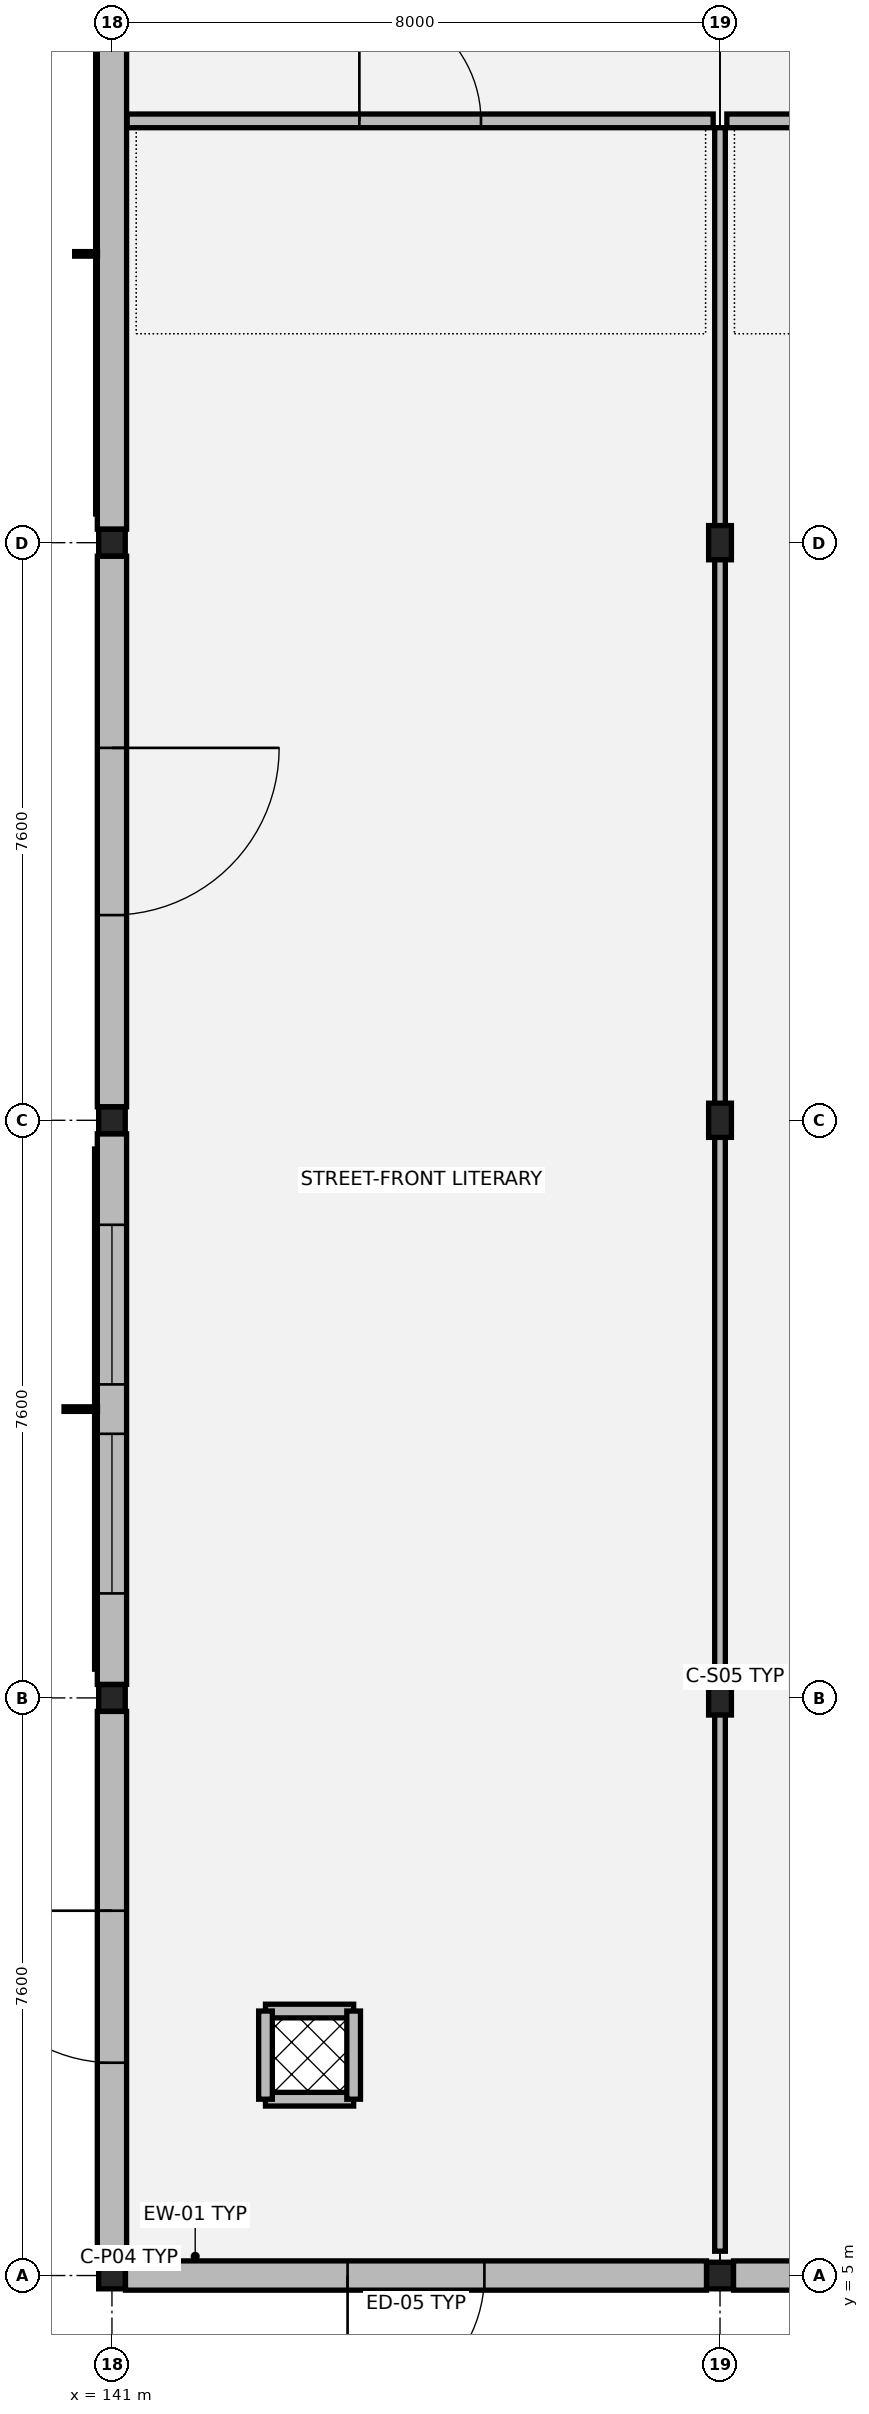
"""IFC4 building model, lengths in metres.
Left out: names, types, materials, properties, quantities, classifications, styles, units other than length and angle.
Written with IfcOpenShell. Run it as: python <this file> out.ifc"""

import sys

from ifc_helpers import new_model, si_unit, direction, frame, frame_2d, origin, origin_2d, place, context, subcontext, project, spatial, rectangle, hollow_rectangle, i_section, extrude, element, fill, save


model = new_model("IFC4")
c1 = context("Model", 3, precision=1e-05, world=origin(), true_north=direction((0.0, 1.0)))
c2 = subcontext(c1, "Body", "Model", "MODEL_VIEW")
j1 = project(units=[si_unit("LENGTHUNIT", "METRE"), si_unit("PLANEANGLEUNIT", "RADIAN")], contexts=[c1])
p1 = place(None, origin())
s1 = spatial("IfcSite", under=j1, at=p1, CompositionType="ELEMENT")
p2 = place(p1, origin())
s2 = spatial("IfcBuilding", under=s1, at=p2, CompositionType="ELEMENT")
p3 = place(p2, origin())
s3 = spatial("IfcBuildingStorey", under=s2, at=p3, CompositionType="ELEMENT", Elevation=0.0)
for number, where, z_axis, x_axis in (
    (1, (141.0, 5.0, 0.0), (0.0, 0.0, 1.0), (1.0, 0.0, 0.0)),
    (2, (141.0, 12.6, 0.0), (0.0, 0.0, 1.0), (1.0, 0.0, 0.0)),
    (3, (141.0, 20.2, 0.0), (0.0, 0.0, 1.0), (1.0, 0.0, 0.0)),
    (4, (141.0, 27.8, 0.0), (0.0, 0.0, 1.0), (1.0, 0.0, 0.0)),
    (5, (149.0, 5.0, 0.0), (0.0, 0.0, 1.0), (1.0, 0.0, 0.0)),
):
    element("IfcColumn", number, at=place(p3, frame(where, z_axis=z_axis, x_axis=x_axis)), inside=s3, PredefinedType="COLUMN", context=c2, shape_type="SweptSolid", body=[
        extrude(hollow_rectangle(XDim=0.35, YDim=0.35, WallThickness=0.014, at=origin_2d()), origin(), (0.0, 0.0, 1.0), 5.075),
    ])
for number, where, z_axis, x_axis in (
    (6, (149.0, 12.6, 0.0), (0.0, 0.0, 1.0), (1.0, 0.0, 0.0)),
    (7, (149.0, 20.2, 0.0), (0.0, 0.0, 1.0), (1.0, 0.0, 0.0)),
    (8, (149.0, 27.8, 0.0), (0.0, 0.0, 1.0), (1.0, 0.0, 0.0)),
):
    element("IfcColumn", number, at=place(p3, frame(where, z_axis=z_axis, x_axis=x_axis)), inside=s3, PredefinedType="COLUMN", context=c2, shape_type="SweptSolid", body=[
        extrude(i_section(OverallWidth=0.3, OverallDepth=0.45, WebThickness=0.014, FlangeThickness=0.026, at=origin_2d()), origin(), (0.0, 0.0, 1.0), 5.075),
    ])
p4 = place(p3, frame((141.178, 5.0, 0.0), z_axis=(0.0, 0.0, 1.0), x_axis=(1.0, 0.0, 0.0)))
e9 = element("IfcWall", 9, at=p4, inside=s3, PredefinedType="SOLIDWALL", context=c2, shape_type="SweptSolid", body=[
    extrude(rectangle(XDim=7.644, YDim=0.385, at=frame_2d((3.822, 0.0))), origin(), (0.0, 0.0, 1.0), 4.5),
])
p5 = place(p4, frame((2.922, 0.0, 0.0)))
e10 = element("IfcOpeningElement", 10, at=p5, cuts=e9, PredefinedType="OPENING", context=c2, shape_type="SweptSolid", body=[
    extrude(rectangle(XDim=1.8, YDim=2.4, at=frame_2d((0.9, 1.2))), frame((0.0, 0.202, 0.0), z_axis=(0.0, -1.0, 0.0), x_axis=(1.0, 0.0, 0.0)), (0.0, 0.0, 1.0), 0.405),
])
p6 = place(p3, frame((149.178, 5.0, 0.0), z_axis=(0.0, 0.0, 1.0), x_axis=(1.0, 0.0, 0.0)))
e11 = element("IfcWall", 11, at=p6, inside=s3, PredefinedType="SOLIDWALL", context=c2, shape_type="SweptSolid", body=[
    extrude(rectangle(XDim=7.644, YDim=0.385, at=frame_2d((3.822, 0.0))), origin(), (0.0, 0.0, 1.0), 4.5),
])
p7 = place(p6, frame((2.872, 0.0, 0.0)))
e12 = element("IfcOpeningElement", 12, at=p7, cuts=e11, PredefinedType="OPENING", context=c2, shape_type="SweptSolid", body=[
    extrude(rectangle(XDim=1.9, YDim=2.42, at=frame_2d((0.95, 1.21))), frame((0.0, 0.202, 0.0), z_axis=(0.0, -1.0, 0.0), x_axis=(1.0, 0.0, 0.0)), (0.0, 0.0, 1.0), 0.405),
])
p8 = place(p3, frame((141.0, 35.222, 0.0), z_axis=(0.0, 0.0, 1.0), x_axis=(0.0, -1.0, 0.0)))
e13 = element("IfcWall", 13, at=p8, inside=s3, PredefinedType="SOLIDWALL", context=c2, shape_type="SweptSolid", body=[
    extrude(rectangle(XDim=7.244, YDim=0.385, at=frame_2d((3.622, 0.0))), origin(), (0.0, 0.0, 1.0), 4.5),
])
p9 = place(p3, frame((141.0, 27.622, 0.0), z_axis=(0.0, 0.0, 1.0), x_axis=(0.0, -1.0, 0.0)))
e14 = element("IfcWall", 14, at=p9, inside=s3, PredefinedType="SOLIDWALL", context=c2, shape_type="SweptSolid", body=[
    extrude(rectangle(XDim=7.244, YDim=0.385, at=frame_2d((3.622, 0.0))), origin(), (0.0, 0.0, 1.0), 4.5),
])
p10 = place(p9, frame((2.522, 0.0, 0.0)))
e15 = element("IfcOpeningElement", 15, at=p10, cuts=e14, PredefinedType="OPENING", context=c2, shape_type="SweptSolid", body=[
    extrude(rectangle(XDim=2.2, YDim=2.5, at=frame_2d((1.1, 1.25))), frame((0.0, 0.202, 0.0), z_axis=(0.0, -1.0, 0.0), x_axis=(1.0, 0.0, 0.0)), (0.0, 0.0, 1.0), 0.405),
])
p11 = place(p3, frame((141.0, 20.022, 0.0), z_axis=(0.0, 0.0, 1.0), x_axis=(0.0, -1.0, 0.0)))
e16 = element("IfcWall", 16, at=p11, inside=s3, PredefinedType="SOLIDWALL", context=c2, shape_type="SweptSolid", body=[
    extrude(rectangle(XDim=7.244, YDim=0.385, at=frame_2d((3.622, 0.0))), origin(), (0.0, 0.0, 1.0), 4.5),
])
p12 = place(p11, frame((1.197, 0.0, 0.8)))
e17 = element("IfcOpeningElement", 17, at=p12, cuts=e16, PredefinedType="OPENING", context=c2, shape_type="SweptSolid", body=[
    extrude(rectangle(XDim=2.1, YDim=2.25, at=frame_2d((1.05, 1.125))), frame((0.0, 0.202, 0.0), z_axis=(0.0, -1.0, 0.0), x_axis=(1.0, 0.0, 0.0)), (0.0, 0.0, 1.0), 0.405),
])
p13 = place(p11, frame((3.947, 0.0, 0.8)))
e18 = element("IfcOpeningElement", 18, at=p13, cuts=e16, PredefinedType="OPENING", context=c2, shape_type="SweptSolid", body=[
    extrude(rectangle(XDim=2.1, YDim=2.25, at=frame_2d((1.05, 1.125))), frame((0.0, 0.202, 0.0), z_axis=(0.0, -1.0, 0.0), x_axis=(1.0, 0.0, 0.0)), (0.0, 0.0, 1.0), 0.405),
])
p14 = place(p3, frame((141.0, 12.422, 0.0), z_axis=(0.0, 0.0, 1.0), x_axis=(0.0, -1.0, 0.0)))
e19 = element("IfcWall", 19, at=p14, inside=s3, PredefinedType="SOLIDWALL", context=c2, shape_type="SweptSolid", body=[
    extrude(rectangle(XDim=7.244, YDim=0.385, at=frame_2d((3.622, 0.0))), origin(), (0.0, 0.0, 1.0), 4.5),
])
p15 = place(p14, frame((2.622, 0.0, 0.0)))
e20 = element("IfcOpeningElement", 20, at=p15, cuts=e19, PredefinedType="OPENING", context=c2, shape_type="SweptSolid", body=[
    extrude(rectangle(XDim=2.0, YDim=2.45, at=frame_2d((1.0, 1.225))), frame((0.0, 0.202, 0.0), z_axis=(0.0, -1.0, 0.0), x_axis=(1.0, 0.0, 0.0)), (0.0, 0.0, 1.0), 0.405),
])
for number, where, z_axis, x_axis in (
    (21, (143.02, 7.32, 0.0), (0.0, 0.0, 1.0), (1.0, 0.0, 0.0)),
    (22, (144.18, 8.48, 0.0), (0.0, 0.0, 1.0), (-1.0, 0.0, 0.0)),
    (23, (143.02, 8.48, 0.0), (0.0, 0.0, 1.0), (0.0, -1.0, 0.0)),
    (24, (144.18, 7.32, 0.0), (0.0, 0.0, 1.0), (0.0, 1.0, 0.0)),
):
    element("IfcWall", number, at=place(p3, frame(where, z_axis=z_axis, x_axis=x_axis)), inside=s3, PredefinedType="PARTITIONING", context=c2, shape_type="SweptSolid", body=[
        extrude(rectangle(XDim=1.16, YDim=0.18, at=frame_2d((0.58, 0.0))), origin(), (0.0, 0.0, 1.0), 4.2),
    ])
p16 = place(p3, frame((141.2, 33.35, 0.0), z_axis=(0.0, 0.0, 1.0), x_axis=(1.0, 0.0, 0.0)))
e25 = element("IfcWall", 25, at=p16, inside=s3, PredefinedType="PARTITIONING", context=c2, shape_type="SweptSolid", body=[
    extrude(rectangle(XDim=7.71, YDim=0.18, at=frame_2d((3.855, 0.0))), origin(), (0.0, 0.0, 1.0), 4.2),
])
p17 = place(p16, frame((3.055, 0.0, 0.0)))
e26 = element("IfcOpeningElement", 26, at=p17, cuts=e25, PredefinedType="OPENING", context=c2, shape_type="SweptSolid", body=[
    extrude(rectangle(XDim=1.6, YDim=2.25, at=frame_2d((0.8, 1.125))), frame((0.0, 0.1, 0.0), z_axis=(0.0, -1.0, 0.0), x_axis=(1.0, 0.0, 0.0)), (0.0, 0.0, 1.0), 0.2),
])
p18 = place(p3, frame((149.09, 33.35, 0.0), z_axis=(0.0, 0.0, 1.0), x_axis=(1.0, 0.0, 0.0)))
e27 = element("IfcWall", 27, at=p18, inside=s3, PredefinedType="PARTITIONING", context=c2, shape_type="SweptSolid", body=[
    extrude(rectangle(XDim=8.46, YDim=0.18, at=frame_2d((4.23, 0.0))), origin(), (0.0, 0.0, 1.0), 4.2),
])
p19 = place(p18, frame((3.53, 0.0, 0.0)))
e28 = element("IfcOpeningElement", 28, at=p19, cuts=e27, PredefinedType="OPENING", context=c2, shape_type="SweptSolid", body=[
    extrude(rectangle(XDim=1.4, YDim=2.22, at=frame_2d((0.7, 1.11))), frame((0.0, 0.1, 0.0), z_axis=(0.0, -1.0, 0.0), x_axis=(1.0, 0.0, 0.0)), (0.0, 0.0, 1.0), 0.2),
])
p20 = place(p3, frame((149.0, 5.32, 0.0), z_axis=(0.0, 0.0, 1.0), x_axis=(0.0, 1.0, 0.0)))
e29 = element("IfcWall", 29, at=p20, inside=s3, PredefinedType="PARTITIONING", context=c2, shape_type="SweptSolid", body=[
    extrude(rectangle(XDim=27.94, YDim=0.14, at=frame_2d((13.97, 0.0))), origin(), (0.0, 0.0, 1.0), 4.2),
])
p21 = place(p5, origin())
e30 = element("IfcDoor", 30, at=p21, inside=s3, OperationType="SINGLE_SWING_RIGHT", PredefinedType="DOOR", context=c2, shape_type="SweptSolid", body=[
    extrude(rectangle(XDim=1.8, YDim=2.4, at=frame_2d((0.9, 1.2))), frame((0.0, 0.025, 0.0), z_axis=(0.0, -1.0, 0.0), x_axis=(1.0, 0.0, 0.0)), (0.0, 0.0, 1.0), 0.05),
])
fill(e10, e30)
p22 = place(p10, origin())
e31 = element("IfcDoor", 31, at=p22, inside=s3, OperationType="SINGLE_SWING_LEFT", PredefinedType="DOOR", context=c2, shape_type="SweptSolid", body=[
    extrude(rectangle(XDim=2.2, YDim=2.5, at=frame_2d((1.1, 1.25))), frame((0.0, 0.025, 0.0), z_axis=(0.0, -1.0, 0.0), x_axis=(1.0, 0.0, 0.0)), (0.0, 0.0, 1.0), 0.05),
])
fill(e15, e31)
p23 = place(p12, origin())
e32 = element("IfcWindow", 32, at=p23, inside=s3, PartitioningType="SINGLE_PANEL", PredefinedType="WINDOW", context=c2, shape_type="SweptSolid", body=[
    extrude(rectangle(XDim=2.1, YDim=2.25, at=frame_2d((1.05, 1.125))), frame((0.0, 0.03, 0.0), z_axis=(0.0, -1.0, 0.0), x_axis=(1.0, 0.0, 0.0)), (0.0, 0.0, 1.0), 0.06),
])
fill(e17, e32)
p24 = place(p13, origin())
e33 = element("IfcWindow", 33, at=p24, inside=s3, PartitioningType="SINGLE_PANEL", PredefinedType="WINDOW", context=c2, shape_type="SweptSolid", body=[
    extrude(rectangle(XDim=2.1, YDim=2.25, at=frame_2d((1.05, 1.125))), frame((0.0, 0.03, 0.0), z_axis=(0.0, -1.0, 0.0), x_axis=(1.0, 0.0, 0.0)), (0.0, 0.0, 1.0), 0.06),
])
fill(e18, e33)
p25 = place(p15, origin())
e34 = element("IfcDoor", 34, at=p25, inside=s3, OperationType="SINGLE_SWING_RIGHT", PredefinedType="DOOR", context=c2, shape_type="SweptSolid", body=[
    extrude(rectangle(XDim=2.0, YDim=2.45, at=frame_2d((1.0, 1.225))), frame((0.0, 0.025, 0.0), z_axis=(0.0, -1.0, 0.0), x_axis=(1.0, 0.0, 0.0)), (0.0, 0.0, 1.0), 0.05),
])
fill(e20, e34)
p26 = place(p17, origin())
e35 = element("IfcDoor", 35, at=p26, inside=s3, OperationType="DOUBLE_DOOR_SINGLE_SWING", PredefinedType="DOOR", context=c2, shape_type="SweptSolid", body=[
    extrude(rectangle(XDim=1.6, YDim=2.25, at=frame_2d((0.8, 1.125))), frame((0.0, 0.025, 0.0), z_axis=(0.0, -1.0, 0.0), x_axis=(1.0, 0.0, 0.0)), (0.0, 0.0, 1.0), 0.05),
])
fill(e26, e35)
save(model, sys.argv[1])
